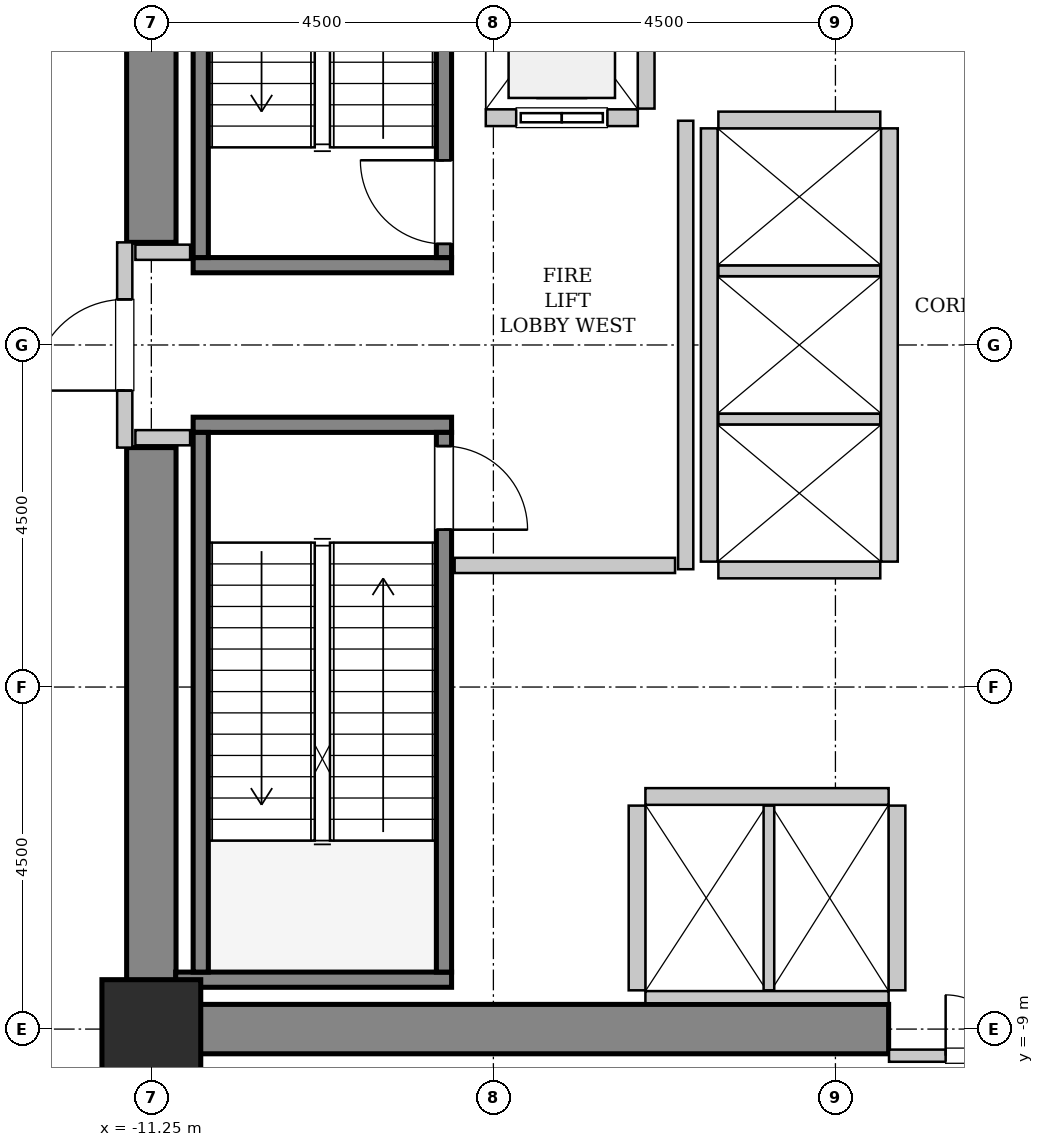
"""IFC4 building model, lengths in metres.
Left out: names, types, materials, properties, quantities, classifications, styles, units other than length and angle.
Written with IfcOpenShell. Run it as: python <this file> out.ifc"""

import sys

from ifc_helpers import new_model, si_unit, direction, frame, frame_2d, origin, origin_2d, place, context, subcontext, project, spatial, rectangle, hollow_rectangle, extrude, source, transform, mapped, element, fill, save


model = new_model("IFC4")
c1 = context("Model", 3, precision=1e-05, world=origin(), true_north=direction((0.0, 1.0)))
c2 = subcontext(c1, "Body", "Model", "MODEL_VIEW")
j1 = project(units=[si_unit("LENGTHUNIT", "METRE"), si_unit("PLANEANGLEUNIT", "RADIAN")], contexts=[c1])
p1 = place(None, origin())
s1 = spatial("IfcSite", under=j1, at=p1, CompositionType="ELEMENT")
p2 = place(p1, origin())
s2 = spatial("IfcBuilding", under=s1, at=p2, CompositionType="ELEMENT")
p3 = place(p2, frame((0.0, 0.0, 22.2)))
s3 = spatial("IfcBuildingStorey", under=s2, at=p3, CompositionType="ELEMENT", Elevation=22.2)
m1 = source(origin(), c2, "Body", "SweptSolid", [
    extrude(rectangle(XDim=10.025, YDim=0.65, at=frame_2d((5.012, 0.0))), origin(), (0.0, 0.0, 1.0), 5.4),
])
p4 = place(p3, frame((-11.575, -9.0, 0.0), z_axis=(0.0, 0.0, 1.0), x_axis=(1.0, 0.0, 0.0)))
e1 = element("IfcWall", 1, at=p4, inside=s3, PredefinedType="SHEAR", context=c2, shape_type="MappedRepresentation", body=[
    mapped(m1, transform((0.0, 0.0, 0.0), x_axis=(1.0, 0.0, 0.0), y_axis=(0.0, 1.0, 0.0), z_axis=(0.0, 0.0, 1.0), scale=1.0)),
])
m2 = source(origin(), c2, "Body", "SweptSolid", [
    extrude(rectangle(XDim=7.325, YDim=0.65, at=frame_2d((3.663, 0.0))), origin(), (0.0, 0.0, 1.0), 5.4),
])
for number, where, z_axis, x_axis in (
    (2, (-11.25, -8.675, 0.0), (0.0, 0.0, 1.0), (0.0, 1.0, 0.0)),
    (3, (-11.25, 1.35, 0.0), (0.0, 0.0, 1.0), (0.0, 1.0, 0.0)),
):
    element("IfcWall", number, at=place(p3, frame(where, z_axis=z_axis, x_axis=x_axis)), inside=s3, PredefinedType="SHEAR", context=c2, shape_type="MappedRepresentation", body=[
        mapped(m2, transform((0.0, 0.0, 0.0), x_axis=(1.0, 0.0, 0.0), y_axis=(0.0, 1.0, 0.0), z_axis=(0.0, 0.0, 1.0), scale=1.0)),
    ])
m3 = source(origin(), c2, "Body", "SweptSolid", [
    extrude(hollow_rectangle(XDim=1.3, YDim=1.3, WallThickness=0.065, InnerFilletRadius=0.065, OuterFilletRadius=0.13, at=origin_2d()), origin(), (0.0, 0.0, 1.0), 5.4),
])
p5 = place(p3, frame((-11.25, -9.0, 0.0), z_axis=(0.0, 0.0, 1.0), x_axis=(1.0, 0.0, 0.0)))
e4 = element("IfcColumn", 4, at=p5, inside=s3, PredefinedType="COLUMN", context=c2, shape_type="MappedRepresentation", body=[
    mapped(m3, transform((0.0, 0.0, 0.0), x_axis=(1.0, 0.0, 0.0), y_axis=(0.0, 1.0, 0.0), z_axis=(0.0, 0.0, 1.0), scale=1.0)),
])
m4 = source(origin(), c2, "Body", "SweptSolid", [
    extrude(rectangle(XDim=3.4, YDim=0.2, at=frame_2d((1.7, 0.0))), origin(), (0.0, 0.0, 1.0), 5.4),
])
p6 = place(p3, frame((-7.3, 1.05, 0.0), z_axis=(0.0, 0.0, 1.0), x_axis=(-1.0, 0.0, 0.0)))
e5 = element("IfcWall", 5, at=p6, inside=s3, PredefinedType="SOLIDWALL", context=c2, shape_type="MappedRepresentation", body=[
    mapped(m4, transform((0.0, 0.0, 0.0), x_axis=(1.0, 0.0, 0.0), y_axis=(0.0, 1.0, 0.0), z_axis=(0.0, 0.0, 1.0), scale=1.0)),
])
m5 = source(origin(), c2, "Body", "SweptSolid", [
    extrude(rectangle(XDim=7.1, YDim=0.2, at=frame_2d((3.55, 0.0))), origin(), (0.0, 0.0, 1.0), 5.4),
])
p7 = place(p3, frame((-7.4, 1.15, 0.0), z_axis=(0.0, 0.0, 1.0), x_axis=(0.0, 1.0, 0.0)))
e6 = element("IfcWall", 6, at=p7, inside=s3, PredefinedType="SOLIDWALL", context=c2, shape_type="MappedRepresentation", body=[
    mapped(m5, transform((0.0, 0.0, 0.0), x_axis=(1.0, 0.0, 0.0), y_axis=(0.0, 1.0, 0.0), z_axis=(0.0, 0.0, 1.0), scale=1.0)),
])
p8 = place(p7, frame((0.18, 0.0, 0.0)))
e7 = element("IfcOpeningElement", 7, at=p8, cuts=e6, PredefinedType="OPENING", context=c2, shape_type="SweptSolid", body=[
    extrude(rectangle(XDim=1.1, YDim=2.15, at=frame_2d((0.55, 1.075))), frame((0.0, 0.11, 0.0), z_axis=(0.0, -1.0, 0.0), x_axis=(1.0, 0.0, 0.0)), (0.0, 0.0, 1.0), 0.22),
])
p9 = place(p3, frame((-10.6, 1.15, 0.0), z_axis=(0.0, 0.0, 1.0), x_axis=(0.0, 1.0, 0.0)))
e8 = element("IfcWall", 8, at=p9, inside=s3, PredefinedType="SOLIDWALL", context=c2, shape_type="MappedRepresentation", body=[
    mapped(m5, transform((0.0, 0.0, 0.0), x_axis=(1.0, 0.0, 0.0), y_axis=(0.0, 1.0, 0.0), z_axis=(0.0, 0.0, 1.0), scale=1.0)),
])
p10 = place(p3, frame((-10.7, -1.05, 0.0), z_axis=(0.0, 0.0, 1.0), x_axis=(1.0, 0.0, 0.0)))
e9 = element("IfcWall", 9, at=p10, inside=s3, PredefinedType="SOLIDWALL", context=c2, shape_type="MappedRepresentation", body=[
    mapped(m4, transform((0.0, 0.0, 0.0), x_axis=(1.0, 0.0, 0.0), y_axis=(0.0, 1.0, 0.0), z_axis=(0.0, 0.0, 1.0), scale=1.0)),
])
m6 = source(origin(), c2, "Body", "SweptSolid", [
    extrude(rectangle(XDim=3.63, YDim=0.2, at=frame_2d((1.815, 0.0))), origin(), (0.0, 0.0, 1.0), 5.4),
])
p11 = place(p3, frame((-10.93, -8.35, 0.0), z_axis=(0.0, 0.0, 1.0), x_axis=(1.0, 0.0, 0.0)))
e10 = element("IfcWall", 10, at=p11, inside=s3, PredefinedType="SOLIDWALL", context=c2, shape_type="MappedRepresentation", body=[
    mapped(m6, transform((0.0, 0.0, 0.0), x_axis=(1.0, 0.0, 0.0), y_axis=(0.0, 1.0, 0.0), z_axis=(0.0, 0.0, 1.0), scale=1.0)),
])
p12 = place(p3, frame((-10.6, -1.15, 0.0), z_axis=(0.0, 0.0, 1.0), x_axis=(0.0, -1.0, 0.0)))
e11 = element("IfcWall", 11, at=p12, inside=s3, PredefinedType="SOLIDWALL", context=c2, shape_type="MappedRepresentation", body=[
    mapped(m5, transform((0.0, 0.0, 0.0), x_axis=(1.0, 0.0, 0.0), y_axis=(0.0, 1.0, 0.0), z_axis=(0.0, 0.0, 1.0), scale=1.0)),
])
p13 = place(p3, frame((-7.4, -1.15, 0.0), z_axis=(0.0, 0.0, 1.0), x_axis=(0.0, -1.0, 0.0)))
e12 = element("IfcWall", 12, at=p13, inside=s3, PredefinedType="SOLIDWALL", context=c2, shape_type="MappedRepresentation", body=[
    mapped(m5, transform((0.0, 0.0, 0.0), x_axis=(1.0, 0.0, 0.0), y_axis=(0.0, 1.0, 0.0), z_axis=(0.0, 0.0, 1.0), scale=1.0)),
])
p14 = place(p13, frame((0.18, 0.0, 0.0)))
e13 = element("IfcOpeningElement", 13, at=p14, cuts=e12, PredefinedType="OPENING", context=c2, shape_type="SweptSolid", body=[
    extrude(rectangle(XDim=1.1, YDim=2.15, at=frame_2d((0.55, 1.075))), frame((0.0, 0.11, 0.0), z_axis=(0.0, -1.0, 0.0), x_axis=(1.0, 0.0, 0.0)), (0.0, 0.0, 1.0), 0.22),
])
m7 = source(origin(), c2, "Body", "SweptSolid", [
    extrude(rectangle(XDim=2.0, YDim=0.22, at=frame_2d((1.0, 0.0))), origin(), (0.0, 0.0, 1.0), 4.905),
])
p15 = place(p3, frame((-6.85, 2.99, 0.0), z_axis=(0.0, 0.0, 1.0), x_axis=(1.0, 0.0, 0.0)))
e14 = element("IfcWall", 14, at=p15, inside=s3, PredefinedType="SOLIDWALL", context=c2, shape_type="MappedRepresentation", body=[
    mapped(m7, transform((0.0, 0.0, 0.0), x_axis=(1.0, 0.0, 0.0), y_axis=(0.0, 1.0, 0.0), z_axis=(0.0, 0.0, 1.0), scale=1.0)),
])
p16 = place(p15, frame((0.4, 0.0, 0.0)))
e15 = element("IfcOpeningElement", 15, at=p16, cuts=e14, PredefinedType="OPENING", context=c2, shape_type="SweptSolid", body=[
    extrude(rectangle(XDim=1.2, YDim=2.2, at=frame_2d((0.6, 1.1))), frame((0.0, 0.12, 0.0), z_axis=(0.0, -1.0, 0.0), x_axis=(1.0, 0.0, 0.0)), (0.0, 0.0, 1.0), 0.24),
])
m8 = source(origin(), c2, "Body", "SweptSolid", [
    extrude(rectangle(XDim=2.68, YDim=0.22, at=frame_2d((1.34, 0.0))), origin(), (0.0, 0.0, 1.0), 4.905),
])
p17 = place(p3, frame((-4.74, 3.11, 0.0), z_axis=(0.0, 0.0, 1.0), x_axis=(0.0, 1.0, 0.0)))
e16 = element("IfcWall", 16, at=p17, inside=s3, PredefinedType="SOLIDWALL", context=c2, shape_type="MappedRepresentation", body=[
    mapped(m8, transform((0.0, 0.0, 0.0), x_axis=(1.0, 0.0, 0.0), y_axis=(0.0, 1.0, 0.0), z_axis=(0.0, 0.0, 1.0), scale=1.0)),
])
m9 = source(origin(), c2, "Body", "SweptSolid", [
    extrude(rectangle(XDim=3.2, YDim=0.22, at=frame_2d((1.6, 0.0))), origin(), (0.0, 0.0, 1.0), 4.905),
])
p18 = place(p3, frame((-1.55, -5.94, 0.0), z_axis=(0.0, 0.0, 1.0), x_axis=(-1.0, 0.0, 0.0)))
e17 = element("IfcWall", 17, at=p18, inside=s3, PredefinedType="SOLIDWALL", context=c2, shape_type="MappedRepresentation", body=[
    mapped(m9, transform((0.0, 0.0, 0.0), x_axis=(1.0, 0.0, 0.0), y_axis=(0.0, 1.0, 0.0), z_axis=(0.0, 0.0, 1.0), scale=1.0)),
])
m10 = source(origin(), c2, "Body", "SweptSolid", [
    extrude(rectangle(XDim=3.2, YDim=0.16, at=frame_2d((1.6, 0.0))), origin(), (0.0, 0.0, 1.0), 3.795),
])
p19 = place(p3, frame((-4.75, -8.58, 0.0), z_axis=(0.0, 0.0, 1.0), x_axis=(1.0, 0.0, 0.0)))
e18 = element("IfcWall", 18, at=p19, inside=s3, PredefinedType="PARTITIONING", context=c2, shape_type="MappedRepresentation", body=[
    mapped(m10, transform((0.0, 0.0, 0.0), x_axis=(1.0, 0.0, 0.0), y_axis=(0.0, 1.0, 0.0), z_axis=(0.0, 0.0, 1.0), scale=1.0)),
])
m11 = source(origin(), c2, "Body", "SweptSolid", [
    extrude(rectangle(XDim=2.43, YDim=0.22, at=frame_2d((1.215, 0.0))), origin(), (0.0, 0.0, 1.0), 4.905),
])
p20 = place(p3, frame((-4.86, -6.06, 0.0), z_axis=(0.0, 0.0, 1.0), x_axis=(0.0, -1.0, 0.0)))
e19 = element("IfcWall", 19, at=p20, inside=s3, PredefinedType="SOLIDWALL", context=c2, shape_type="MappedRepresentation", body=[
    mapped(m11, transform((0.0, 0.0, 0.0), x_axis=(1.0, 0.0, 0.0), y_axis=(0.0, 1.0, 0.0), z_axis=(0.0, 0.0, 1.0), scale=1.0)),
])
m12 = source(origin(), c2, "Body", "SweptSolid", [
    extrude(rectangle(XDim=2.43, YDim=0.14, at=frame_2d((1.215, 0.0))), origin(), (0.0, 0.0, 1.0), 4.905),
])
p21 = place(p3, frame((-3.125, -8.49, 0.0), z_axis=(0.0, 0.0, 1.0), x_axis=(0.0, 1.0, 0.0)))
e20 = element("IfcWall", 20, at=p21, inside=s3, PredefinedType="PARTITIONING", context=c2, shape_type="MappedRepresentation", body=[
    mapped(m12, transform((0.0, 0.0, 0.0), x_axis=(1.0, 0.0, 0.0), y_axis=(0.0, 1.0, 0.0), z_axis=(0.0, 0.0, 1.0), scale=1.0)),
])
p22 = place(p3, frame((-1.44, -8.49, 0.0), z_axis=(0.0, 0.0, 1.0), x_axis=(0.0, 1.0, 0.0)))
e21 = element("IfcWall", 21, at=p22, inside=s3, PredefinedType="SOLIDWALL", context=c2, shape_type="MappedRepresentation", body=[
    mapped(m11, transform((0.0, 0.0, 0.0), x_axis=(1.0, 0.0, 0.0), y_axis=(0.0, 1.0, 0.0), z_axis=(0.0, 0.0, 1.0), scale=1.0)),
])
m13 = source(origin(), c2, "Body", "SweptSolid", [
    extrude(rectangle(XDim=5.7, YDim=0.22, at=frame_2d((2.85, 0.0))), origin(), (0.0, 0.0, 1.0), 4.905),
])
for number, where, z_axis, x_axis in (
    (22, (-1.54, -2.85, 0.0), (0.0, 0.0, 1.0), (0.0, 1.0, 0.0)),
    (23, (-3.91, 2.85, 0.0), (0.0, 0.0, 1.0), (0.0, -1.0, 0.0)),
):
    element("IfcWall", number, at=place(p3, frame(where, z_axis=z_axis, x_axis=x_axis)), inside=s3, PredefinedType="SOLIDWALL", context=c2, shape_type="MappedRepresentation", body=[
        mapped(m13, transform((0.0, 0.0, 0.0), x_axis=(1.0, 0.0, 0.0), y_axis=(0.0, 1.0, 0.0), z_axis=(0.0, 0.0, 1.0), scale=1.0)),
    ])
m14 = source(origin(), c2, "Body", "SweptSolid", [
    extrude(rectangle(XDim=2.13, YDim=0.22, at=frame_2d((1.065, 0.0))), origin(), (0.0, 0.0, 1.0), 4.905),
])
p23 = place(p3, frame((-3.79, -2.96, 0.0), z_axis=(0.0, 0.0, 1.0), x_axis=(1.0, 0.0, 0.0)))
e24 = element("IfcWall", 24, at=p23, inside=s3, PredefinedType="SOLIDWALL", context=c2, shape_type="MappedRepresentation", body=[
    mapped(m14, transform((0.0, 0.0, 0.0), x_axis=(1.0, 0.0, 0.0), y_axis=(0.0, 1.0, 0.0), z_axis=(0.0, 0.0, 1.0), scale=1.0)),
])
m15 = source(origin(), c2, "Body", "SweptSolid", [
    extrude(rectangle(XDim=2.13, YDim=0.14, at=frame_2d((1.065, 0.0))), origin(), (0.0, 0.0, 1.0), 4.905),
])
for number, where, z_axis, x_axis in (
    (25, (-3.79, -0.975, 0.0), (0.0, 0.0, 1.0), (1.0, 0.0, 0.0)),
    (26, (-3.79, 0.975, 0.0), (0.0, 0.0, 1.0), (1.0, 0.0, 0.0)),
):
    element("IfcWall", number, at=place(p3, frame(where, z_axis=z_axis, x_axis=x_axis)), inside=s3, PredefinedType="PARTITIONING", context=c2, shape_type="MappedRepresentation", body=[
        mapped(m15, transform((0.0, 0.0, 0.0), x_axis=(1.0, 0.0, 0.0), y_axis=(0.0, 1.0, 0.0), z_axis=(0.0, 0.0, 1.0), scale=1.0)),
    ])
p24 = place(p3, frame((-1.66, 2.96, 0.0), z_axis=(0.0, 0.0, 1.0), x_axis=(-1.0, 0.0, 0.0)))
e27 = element("IfcWall", 27, at=p24, inside=s3, PredefinedType="SOLIDWALL", context=c2, shape_type="MappedRepresentation", body=[
    mapped(m14, transform((0.0, 0.0, 0.0), x_axis=(1.0, 0.0, 0.0), y_axis=(0.0, 1.0, 0.0), z_axis=(0.0, 0.0, 1.0), scale=1.0)),
])
m16 = source(origin(), c2, "Body", "SweptSolid", [
    extrude(rectangle(XDim=2.7, YDim=0.2, at=frame_2d((1.35, 0.0))), origin(), (0.0, 0.0, 1.0), 3.795),
])
p25 = place(p3, frame((-11.6, -1.35, 0.0), z_axis=(0.0, 0.0, 1.0), x_axis=(0.0, 1.0, 0.0)))
e28 = element("IfcWall", 28, at=p25, inside=s3, PredefinedType="PARTITIONING", context=c2, shape_type="MappedRepresentation", body=[
    mapped(m16, transform((0.0, 0.0, 0.0), x_axis=(1.0, 0.0, 0.0), y_axis=(0.0, 1.0, 0.0), z_axis=(0.0, 0.0, 1.0), scale=1.0)),
])
p26 = place(p25, frame((0.75, 0.0, 0.0)))
e29 = element("IfcOpeningElement", 29, at=p26, cuts=e28, PredefinedType="OPENING", context=c2, shape_type="SweptSolid", body=[
    extrude(rectangle(XDim=1.2, YDim=2.15, at=frame_2d((0.6, 1.075))), frame((0.0, 0.11, 0.0), z_axis=(0.0, -1.0, 0.0), x_axis=(1.0, 0.0, 0.0)), (0.0, 0.0, 1.0), 0.22),
])
m17 = source(origin(), c2, "Body", "SweptSolid", [
    extrude(rectangle(XDim=5.9, YDim=0.2, at=frame_2d((2.95, 0.0))), origin(), (0.0, 0.0, 1.0), 4.905),
])
p27 = place(p3, frame((-4.22, -2.95, 0.0), z_axis=(0.0, 0.0, 1.0), x_axis=(0.0, 1.0, 0.0)))
e30 = element("IfcWall", 30, at=p27, inside=s3, PredefinedType="PARTITIONING", context=c2, shape_type="MappedRepresentation", body=[
    mapped(m17, transform((0.0, 0.0, 0.0), x_axis=(1.0, 0.0, 0.0), y_axis=(0.0, 1.0, 0.0), z_axis=(0.0, 0.0, 1.0), scale=1.0)),
])
m18 = source(origin(), c2, "Body", "SweptSolid", [
    extrude(rectangle(XDim=2.9, YDim=0.2, at=frame_2d((1.45, 0.0))), origin(), (0.0, 0.0, 1.0), 4.905),
])
p28 = place(p3, frame((-7.26, -2.9, 0.0), z_axis=(0.0, 0.0, 1.0), x_axis=(1.0, 0.0, 0.0)))
e31 = element("IfcWall", 31, at=p28, inside=s3, PredefinedType="PARTITIONING", context=c2, shape_type="MappedRepresentation", body=[
    mapped(m18, transform((0.0, 0.0, 0.0), x_axis=(1.0, 0.0, 0.0), y_axis=(0.0, 1.0, 0.0), z_axis=(0.0, 0.0, 1.0), scale=1.0)),
])
m19 = source(origin(), c2, "Body", "SweptSolid", [
    extrude(rectangle(XDim=0.72, YDim=0.2, at=frame_2d((0.36, 0.0))), origin(), (0.0, 0.0, 1.0), 4.905),
])
for number, where, z_axis, x_axis in (
    (32, (-11.46, 1.22, 0.0), (0.0, 0.0, 1.0), (1.0, 0.0, 0.0)),
    (33, (-11.46, -1.22, 0.0), (0.0, 0.0, 1.0), (1.0, 0.0, 0.0)),
):
    element("IfcWall", number, at=place(p3, frame(where, z_axis=z_axis, x_axis=x_axis)), inside=s3, PredefinedType="PARTITIONING", context=c2, shape_type="MappedRepresentation", body=[
        mapped(m19, transform((0.0, 0.0, 0.0), x_axis=(1.0, 0.0, 0.0), y_axis=(0.0, 1.0, 0.0), z_axis=(0.0, 0.0, 1.0), scale=1.0)),
    ])
m20 = source(origin(), c2, "Body", "SweptSolid", [
    extrude(rectangle(XDim=3.09, YDim=0.16, at=frame_2d((1.545, 0.0))), origin(), (0.0, 0.0, 1.0), 3.795),
])
p29 = place(p3, frame((-1.545, -9.35, 0.0), z_axis=(0.0, 0.0, 1.0), x_axis=(1.0, 0.0, 0.0)))
e34 = element("IfcWall", 34, at=p29, inside=s3, PredefinedType="PARTITIONING", context=c2, shape_type="MappedRepresentation", body=[
    mapped(m20, transform((0.0, 0.0, 0.0), x_axis=(1.0, 0.0, 0.0), y_axis=(0.0, 1.0, 0.0), z_axis=(0.0, 0.0, 1.0), scale=1.0)),
])
p30 = place(p29, frame((0.745, 0.0, 0.0)))
e35 = element("IfcOpeningElement", 35, at=p30, cuts=e34, PredefinedType="OPENING", context=c2, shape_type="SweptSolid", body=[
    extrude(rectangle(XDim=1.6, YDim=2.3, at=frame_2d((0.8, 1.15))), frame((0.0, 0.09, 0.0), z_axis=(0.0, -1.0, 0.0), x_axis=(1.0, 0.0, 0.0)), (0.0, 0.0, 1.0), 0.18),
])
m21 = source(origin(), c2, "Body", "SweptSolid", [
    extrude(rectangle(XDim=1.1, YDim=2.15, at=frame_2d((0.55, 1.075))), frame((0.0, 0.025, 0.0), z_axis=(0.0, -1.0, 0.0), x_axis=(1.0, 0.0, 0.0)), (0.0, 0.0, 1.0), 0.05),
])
p31 = place(p8, origin())
e36 = element("IfcDoor", 36, at=p31, inside=s3, OperationType="SINGLE_SWING_RIGHT", PredefinedType="DOOR", context=c2, shape_type="MappedRepresentation", body=[
    mapped(m21, transform((0.0, 0.0, 0.0), x_axis=(1.0, 0.0, 0.0), y_axis=(0.0, 1.0, 0.0), z_axis=(0.0, 0.0, 1.0), scale=1.0)),
])
fill(e7, e36)
p32 = place(p14, origin())
e37 = element("IfcDoor", 37, at=p32, inside=s3, OperationType="SINGLE_SWING_RIGHT", PredefinedType="DOOR", context=c2, shape_type="MappedRepresentation", body=[
    mapped(m21, transform((0.0, 0.0, 0.0), x_axis=(1.0, 0.0, 0.0), y_axis=(0.0, 1.0, 0.0), z_axis=(0.0, 0.0, 1.0), scale=1.0)),
])
fill(e13, e37)
m22 = source(origin(), c2, "Body", "SweptSolid", [
    extrude(rectangle(XDim=1.2, YDim=2.2, at=frame_2d((0.6, 1.1))), frame((0.0, 0.025, 0.0), z_axis=(0.0, -1.0, 0.0), x_axis=(1.0, 0.0, 0.0)), (0.0, 0.0, 1.0), 0.05),
])
p33 = place(p16, origin())
e38 = element("IfcDoor", 38, at=p33, inside=s3, OperationType="SLIDING_TO_LEFT", PredefinedType="DOOR", context=c2, shape_type="MappedRepresentation", body=[
    mapped(m22, transform((0.0, 0.0, 0.0), x_axis=(1.0, 0.0, 0.0), y_axis=(0.0, 1.0, 0.0), z_axis=(0.0, 0.0, 1.0), scale=1.0)),
])
fill(e15, e38)
m23 = source(origin(), c2, "Body", "SweptSolid", [
    extrude(rectangle(XDim=1.2, YDim=2.15, at=frame_2d((0.6, 1.075))), frame((0.0, 0.025, 0.0), z_axis=(0.0, -1.0, 0.0), x_axis=(1.0, 0.0, 0.0)), (0.0, 0.0, 1.0), 0.05),
])
p34 = place(p26, origin())
e39 = element("IfcDoor", 39, at=p34, inside=s3, OperationType="SINGLE_SWING_LEFT", PredefinedType="DOOR", context=c2, shape_type="MappedRepresentation", body=[
    mapped(m23, transform((0.0, 0.0, 0.0), x_axis=(1.0, 0.0, 0.0), y_axis=(0.0, 1.0, 0.0), z_axis=(0.0, 0.0, 1.0), scale=1.0)),
])
fill(e29, e39)
m24 = source(origin(), c2, "Body", "SweptSolid", [
    extrude(rectangle(XDim=1.6, YDim=2.3, at=frame_2d((0.8, 1.15))), frame((0.0, 0.025, 0.0), z_axis=(0.0, -1.0, 0.0), x_axis=(1.0, 0.0, 0.0)), (0.0, 0.0, 1.0), 0.05),
])
p35 = place(p30, origin())
e40 = element("IfcDoor", 40, at=p35, inside=s3, OperationType="DOUBLE_DOOR_SINGLE_SWING", PredefinedType="DOOR", context=c2, shape_type="MappedRepresentation", body=[
    mapped(m24, transform((0.0, 0.0, 0.0), x_axis=(1.0, 0.0, 0.0), y_axis=(0.0, 1.0, 0.0), z_axis=(0.0, 0.0, 1.0), scale=1.0)),
])
fill(e35, e40)
save(model, sys.argv[1])
